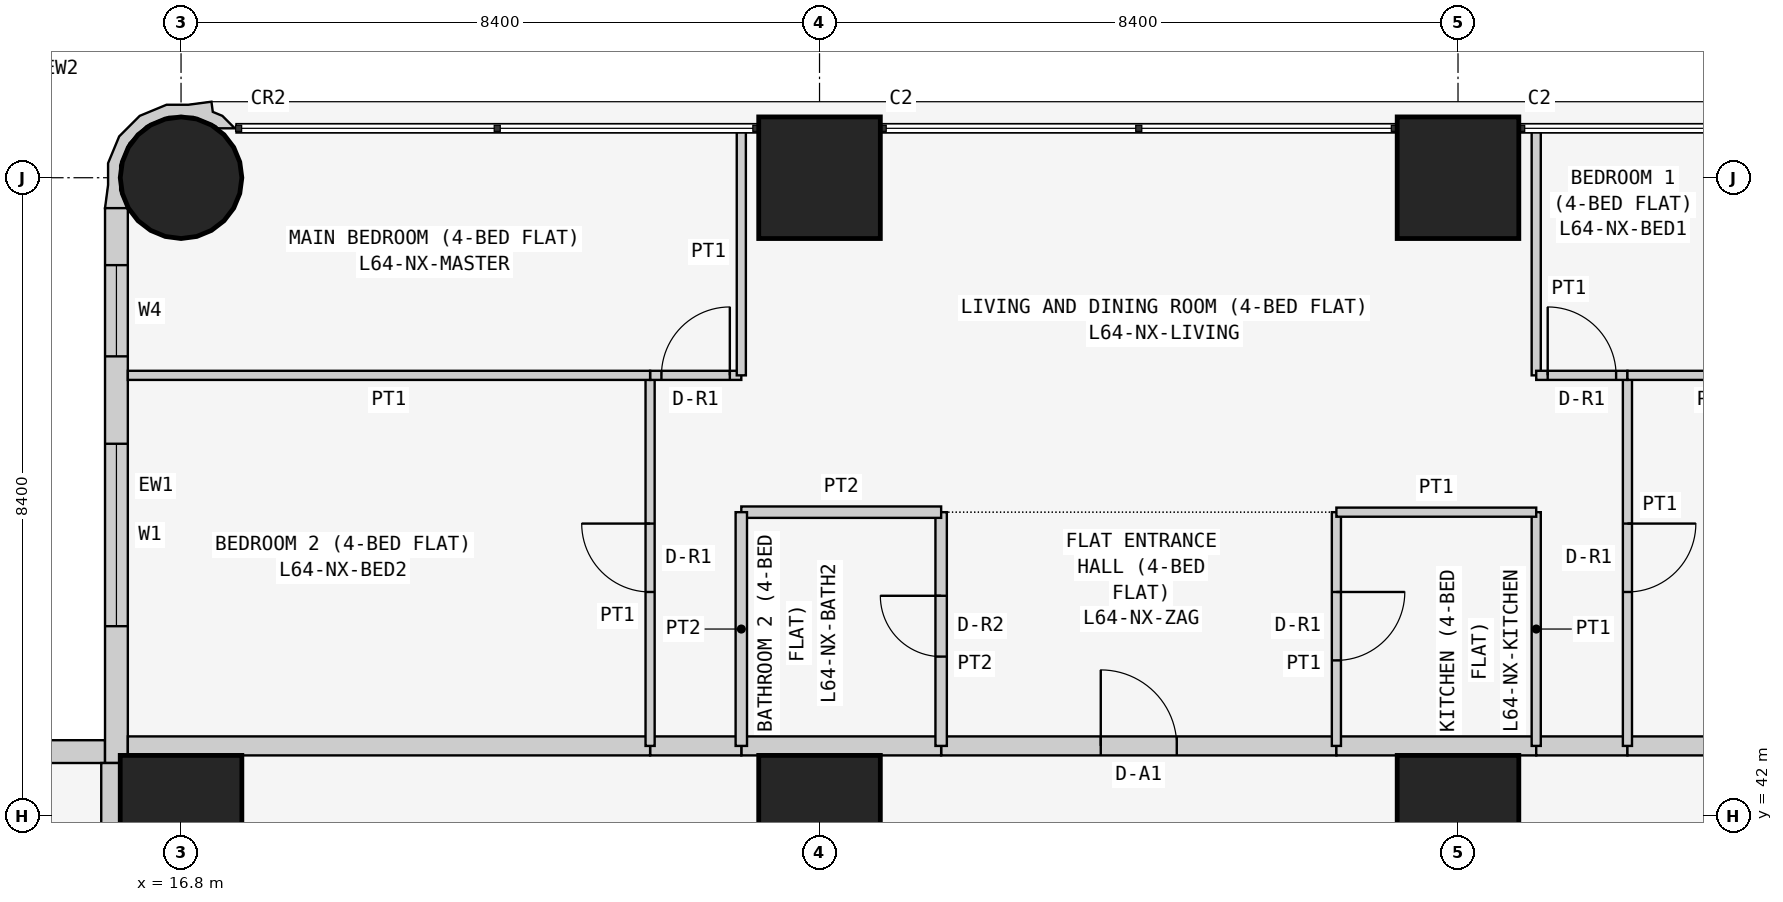
"""IFC4 building model, lengths in metres.
Left out: names, types, materials, properties, quantities, classifications, styles, units other than length and angle.
Written with IfcOpenShell. Run it as: python <this file> out.ifc"""

import sys

from ifc_helpers import new_model, si_unit, direction, frame, frame_2d, origin, origin_2d, place, context, subcontext, project, spatial, polyline, rectangle, circle, outline, extrude, element, fill, save


model = new_model("IFC4")
c1 = context("Model", 3, precision=1e-05, world=origin(), true_north=direction((0.0, 1.0)))
c2 = subcontext(c1, "Body", "Model", "MODEL_VIEW")
j1 = project(units=[si_unit("LENGTHUNIT", "METRE"), si_unit("PLANEANGLEUNIT", "RADIAN")], contexts=[c1])
p1 = place(None, origin())
s1 = spatial("IfcSite", under=j1, at=p1, CompositionType="ELEMENT")
p2 = place(p1, origin())
s2 = spatial("IfcBuilding", under=s1, at=p2, CompositionType="ELEMENT")
p3 = place(p2, frame((0.0, 0.0, 244.5)))
s3 = spatial("IfcBuildingStorey", under=s2, at=p3, CompositionType="ELEMENT", Elevation=244.5)
p4 = place(p3, frame((16.8, 42.0, 0.0), z_axis=(0.0, 0.0, 1.0), x_axis=(1.0, 0.0, 0.0)))
e1 = element("IfcColumn", 1, at=p4, inside=s3, PredefinedType="COLUMN", context=c2, shape_type="SweptSolid", body=[
    extrude(rectangle(XDim=1.6, YDim=1.6, at=origin_2d()), origin(), (0.0, 0.0, 1.0), 3.6),
])
p5 = place(p3, frame((16.8, 50.4, 0.0), z_axis=(0.0, 0.0, 1.0), x_axis=(1.0, 0.0, 0.0)))
e2 = element("IfcColumn", 2, at=p5, inside=s3, PredefinedType="COLUMN", context=c2, shape_type="SweptSolid", body=[
    extrude(circle(Radius=0.8, at=origin_2d()), origin(), (0.0, 0.0, 1.0), 3.6),
])
for number, where, z_axis, x_axis in (
    (3, (25.2, 42.0, 0.0), (0.0, 0.0, 1.0), (1.0, 0.0, 0.0)),
    (4, (25.2, 50.4, 0.0), (0.0, 0.0, 1.0), (1.0, 0.0, 0.0)),
    (5, (33.6, 42.0, 0.0), (0.0, 0.0, 1.0), (1.0, 0.0, 0.0)),
    (6, (33.6, 50.4, 0.0), (0.0, 0.0, 1.0), (1.0, 0.0, 0.0)),
):
    element("IfcColumn", number, at=place(p3, frame(where, z_axis=z_axis, x_axis=x_axis)), inside=s3, PredefinedType="COLUMN", context=c2, shape_type="SweptSolid", body=[
        extrude(rectangle(XDim=1.6, YDim=1.6, at=origin_2d()), origin(), (0.0, 0.0, 1.0), 3.6),
    ])
p6 = place(p3, frame((15.8, 42.85, 0.0), z_axis=(0.0, 0.0, 1.0), x_axis=(-1.0, 0.0, 0.0)))
e7 = element("IfcWall", 7, at=p6, inside=s3, PredefinedType="SOLIDWALL", context=c2, shape_type="SweptSolid", body=[
    extrude(rectangle(XDim=15.4, YDim=0.3, at=frame_2d((7.7, 0.0))), origin(), (0.0, 0.0, 1.0), 3.35),
])
p7 = place(p6, frame((1.2, 0.0, 0.9)))
e8 = element("IfcOpeningElement", 8, at=p7, cuts=e7, PredefinedType="OPENING", context=c2, shape_type="SweptSolid", body=[
    extrude(rectangle(XDim=1.8, YDim=1.5, at=frame_2d((0.9, 0.75))), frame((0.0, 0.16, 0.0), z_axis=(0.0, -1.0, 0.0), x_axis=(1.0, 0.0, 0.0)), (0.0, 0.0, 1.0), 0.32),
])
p8 = place(p6, frame((4.95, 0.0, 1.5)))
e9 = element("IfcOpeningElement", 9, at=p8, cuts=e7, PredefinedType="OPENING", context=c2, shape_type="SweptSolid", body=[
    extrude(rectangle(XDim=0.9, YDim=0.7, at=frame_2d((0.45, 0.35))), frame((0.0, 0.16, 0.0), z_axis=(0.0, -1.0, 0.0), x_axis=(1.0, 0.0, 0.0)), (0.0, 0.0, 1.0), 0.32),
])
p9 = place(p6, frame((8.5, 0.0, 0.9)))
e10 = element("IfcOpeningElement", 10, at=p9, cuts=e7, PredefinedType="OPENING", context=c2, shape_type="SweptSolid", body=[
    extrude(rectangle(XDim=1.8, YDim=1.5, at=frame_2d((0.9, 0.75))), frame((0.0, 0.16, 0.0), z_axis=(0.0, -1.0, 0.0), x_axis=(1.0, 0.0, 0.0)), (0.0, 0.0, 1.0), 0.32),
])
p10 = place(p6, frame((12.5, 0.0, 0.0)))
e11 = element("IfcOpeningElement", 11, at=p10, cuts=e7, PredefinedType="OPENING", context=c2, shape_type="SweptSolid", body=[
    extrude(rectangle(XDim=0.9, YDim=2.4, at=frame_2d((0.45, 1.2))), frame((0.0, 0.16, 0.0), z_axis=(0.0, -1.0, 0.0), x_axis=(1.0, 0.0, 0.0)), (0.0, 0.0, 1.0), 0.32),
])
p11 = place(p6, frame((13.5, 0.0, 0.9)))
e12 = element("IfcOpeningElement", 12, at=p11, cuts=e7, PredefinedType="OPENING", context=c2, shape_type="SweptSolid", body=[
    extrude(rectangle(XDim=1.2, YDim=1.5, at=frame_2d((0.6, 0.75))), frame((0.0, 0.16, 0.0), z_axis=(0.0, -1.0, 0.0), x_axis=(1.0, 0.0, 0.0)), (0.0, 0.0, 1.0), 0.32),
])
p12 = place(p3, frame((15.95, 50.0, 0.0), z_axis=(0.0, 0.0, 1.0), x_axis=(0.0, -1.0, 0.0)))
e13 = element("IfcWall", 13, at=p12, inside=s3, PredefinedType="SOLIDWALL", context=c2, shape_type="SweptSolid", body=[
    extrude(rectangle(XDim=7.3, YDim=0.3, at=frame_2d((3.65, 0.0))), origin(), (0.0, 0.0, 1.0), 3.35),
])
p13 = place(p12, frame((3.1, 0.0, 0.9)))
e14 = element("IfcOpeningElement", 14, at=p13, cuts=e13, PredefinedType="OPENING", context=c2, shape_type="SweptSolid", body=[
    extrude(rectangle(XDim=2.4, YDim=1.5, at=frame_2d((1.2, 0.75))), frame((0.0, 0.16, 0.0), z_axis=(0.0, -1.0, 0.0), x_axis=(1.0, 0.0, 0.0)), (0.0, 0.0, 1.0), 0.32),
])
p14 = place(p12, frame((0.75, 0.0, 0.9)))
e15 = element("IfcOpeningElement", 15, at=p14, cuts=e13, PredefinedType="OPENING", context=c2, shape_type="SweptSolid", body=[
    extrude(rectangle(XDim=1.2, YDim=1.5, at=frame_2d((0.6, 0.75))), frame((0.0, 0.16, 0.0), z_axis=(0.0, -1.0, 0.0), x_axis=(1.0, 0.0, 0.0)), (0.0, 0.0, 1.0), 0.32),
])
p15 = place(p3, frame((17.448, 50.995, 0.0), z_axis=(0.0, 0.0, 1.0), x_axis=(-0.343276641956, 0.93923434088, 0.0)))
e16 = element("IfcWall", 16, at=p15, inside=s3, PredefinedType="SOLIDWALL", context=c2, shape_type="SweptSolid", body=[
    extrude(outline(polyline([(0.241, 0.023), (0.333, 0.124), (0.465, 0.094), (0.532, 0.393), (0.631, 0.663), (0.614, 1.045), (0.454, 1.391), (0.172, 1.649), (-0.098, 1.748), (-0.369, 1.89), (-0.509, 1.621), (-0.491, 1.615), (-0.479, 1.609), (-0.211, 1.62), (0.088, 1.511), (0.323, 1.295), (0.457, 1.006), (0.47, 0.688), (0.361, 0.389), (0.145, 0.154), (0.108, 0.137), (0.031, -0.075), (0.241, 0.023)])), origin(), (0.0, 0.0, 1.0), 3.35),
])
p16 = place(p3, frame((26.8, 42.925, 0.0), z_axis=(0.0, 0.0, 1.0), x_axis=(1.0, 0.0, 0.0)))
e17 = element("IfcWall", 17, at=p16, inside=s3, PredefinedType="PARTITIONING", context=c2, shape_type="SweptSolid", body=[
    extrude(rectangle(XDim=5.2, YDim=0.25, at=frame_2d((2.6, 0.0))), origin(), (0.0, 0.0, 1.0), 3.35),
])
p17 = place(p16, frame((2.1, 0.0, 0.0)))
e18 = element("IfcOpeningElement", 18, at=p17, cuts=e17, PredefinedType="OPENING", context=c2, shape_type="SweptSolid", body=[
    extrude(rectangle(XDim=1.0, YDim=2.1, at=frame_2d((0.5, 1.05))), frame((0.0, 0.135, 0.0), z_axis=(0.0, -1.0, 0.0), x_axis=(1.0, 0.0, 0.0)), (0.0, 0.0, 1.0), 0.27),
])
p18 = place(p3, frame((24.171, 42.925, 0.0), z_axis=(0.0, 0.0, 1.0), x_axis=(1.0, 0.0, 0.0)))
e19 = element("IfcWall", 19, at=p18, inside=s3, PredefinedType="PARTITIONING", context=c2, shape_type="SweptSolid", body=[
    extrude(rectangle(XDim=2.629, YDim=0.25, at=frame_2d((1.314, 0.0))), origin(), (0.0, 0.0, 1.0), 3.35),
])
p19 = place(p3, frame((32.0, 42.925, 0.0), z_axis=(0.0, 0.0, 1.0), x_axis=(1.0, 0.0, 0.0)))
e20 = element("IfcWall", 20, at=p19, inside=s3, PredefinedType="PARTITIONING", context=c2, shape_type="SweptSolid", body=[
    extrude(rectangle(XDim=2.629, YDim=0.25, at=frame_2d((1.314, 0.0))), origin(), (0.0, 0.0, 1.0), 3.35),
])
p20 = place(p3, frame((22.971, 42.925, 0.0), z_axis=(0.0, 0.0, 1.0), x_axis=(1.0, 0.0, 0.0)))
e21 = element("IfcWall", 21, at=p20, inside=s3, PredefinedType="PARTITIONING", context=c2, shape_type="SweptSolid", body=[
    extrude(rectangle(XDim=1.2, YDim=0.25, at=frame_2d((0.6, 0.0))), origin(), (0.0, 0.0, 1.0), 3.35),
])
p21 = place(p3, frame((34.629, 42.925, 0.0), z_axis=(0.0, 0.0, 1.0), x_axis=(1.0, 0.0, 0.0)))
e22 = element("IfcWall", 22, at=p21, inside=s3, PredefinedType="PARTITIONING", context=c2, shape_type="SweptSolid", body=[
    extrude(rectangle(XDim=1.2, YDim=0.25, at=frame_2d((0.6, 0.0))), origin(), (0.0, 0.0, 1.0), 3.35),
])
for number, where, z_axis, x_axis in (
    (23, (16.1, 42.925, 0.0), (0.0, 0.0, 1.0), (1.0, 0.0, 0.0)),
    (24, (35.829, 42.925, 0.0), (0.0, 0.0, 1.0), (1.0, 0.0, 0.0)),
):
    element("IfcWall", number, at=place(p3, frame(where, z_axis=z_axis, x_axis=x_axis)), inside=s3, PredefinedType="PARTITIONING", context=c2, shape_type="SweptSolid", body=[
        extrude(rectangle(XDim=6.871, YDim=0.25, at=frame_2d((3.436, 0.0))), origin(), (0.0, 0.0, 1.0), 3.35),
    ])
p22 = place(p3, frame((15.875, 36.229, 0.0), z_axis=(0.0, 0.0, 1.0), x_axis=(0.0, 1.0, 0.0)))
e25 = element("IfcWall", 25, at=p22, inside=s3, PredefinedType="PARTITIONING", context=c2, shape_type="SweptSolid", body=[
    extrude(rectangle(XDim=6.471, YDim=0.25, at=frame_2d((3.235, 0.0))), origin(), (0.0, 0.0, 1.0), 3.35),
])
p23 = place(p3, frame((26.8, 46.0, 0.0), z_axis=(0.0, 0.0, 1.0), x_axis=(0.0, -1.0, 0.0)))
e26 = element("IfcWall", 26, at=p23, inside=s3, PredefinedType="PARTITIONING", context=c2, shape_type="SweptSolid", body=[
    extrude(rectangle(XDim=3.075, YDim=0.15, at=frame_2d((1.538, 0.0))), origin(), (0.0, 0.0, 1.0), 3.35),
])
p24 = place(p23, frame((1.1, 0.0, 0.0)))
e27 = element("IfcOpeningElement", 27, at=p24, cuts=e26, PredefinedType="OPENING", context=c2, shape_type="SweptSolid", body=[
    extrude(rectangle(XDim=0.8, YDim=2.1, at=frame_2d((0.4, 1.05))), frame((0.0, 0.085, 0.0), z_axis=(0.0, -1.0, 0.0), x_axis=(1.0, 0.0, 0.0)), (0.0, 0.0, 1.0), 0.17),
])
p25 = place(p3, frame((32.0, 42.925, 0.0), z_axis=(0.0, 0.0, 1.0), x_axis=(0.0, 1.0, 0.0)))
e28 = element("IfcWall", 28, at=p25, inside=s3, PredefinedType="PARTITIONING", context=c2, shape_type="SweptSolid", body=[
    extrude(rectangle(XDim=3.075, YDim=0.12, at=frame_2d((1.538, 0.0))), origin(), (0.0, 0.0, 1.0), 3.35),
])
p26 = place(p25, frame((1.125, 0.0, 0.0)))
e29 = element("IfcOpeningElement", 29, at=p26, cuts=e28, PredefinedType="OPENING", context=c2, shape_type="SweptSolid", body=[
    extrude(rectangle(XDim=0.9, YDim=2.1, at=frame_2d((0.45, 1.05))), frame((0.0, 0.07, 0.0), z_axis=(0.0, -1.0, 0.0), x_axis=(1.0, 0.0, 0.0)), (0.0, 0.0, 1.0), 0.14),
])
p27 = place(p3, frame((26.8, 46.0, 0.0), z_axis=(0.0, 0.0, 1.0), x_axis=(-1.0, 0.0, 0.0)))
e30 = element("IfcWall", 30, at=p27, inside=s3, PredefinedType="PARTITIONING", context=c2, shape_type="SweptSolid", body=[
    extrude(rectangle(XDim=2.629, YDim=0.15, at=frame_2d((1.314, 0.0))), origin(), (0.0, 0.0, 1.0), 3.35),
])
p28 = place(p3, frame((24.171, 46.0, 0.0), z_axis=(0.0, 0.0, 1.0), x_axis=(0.0, -1.0, 0.0)))
e31 = element("IfcWall", 31, at=p28, inside=s3, PredefinedType="PARTITIONING", context=c2, shape_type="SweptSolid", body=[
    extrude(rectangle(XDim=3.075, YDim=0.15, at=frame_2d((1.538, 0.0))), origin(), (0.0, 0.0, 1.0), 3.35),
])
p29 = place(p3, frame((34.629, 42.925, 0.0), z_axis=(0.0, 0.0, 1.0), x_axis=(0.0, 1.0, 0.0)))
e32 = element("IfcWall", 32, at=p29, inside=s3, PredefinedType="PARTITIONING", context=c2, shape_type="SweptSolid", body=[
    extrude(rectangle(XDim=3.075, YDim=0.12, at=frame_2d((1.538, 0.0))), origin(), (0.0, 0.0, 1.0), 3.35),
])
p30 = place(p3, frame((34.629, 46.0, 0.0), z_axis=(0.0, 0.0, 1.0), x_axis=(-1.0, 0.0, 0.0)))
e33 = element("IfcWall", 33, at=p30, inside=s3, PredefinedType="PARTITIONING", context=c2, shape_type="SweptSolid", body=[
    extrude(rectangle(XDim=2.629, YDim=0.12, at=frame_2d((1.314, 0.0))), origin(), (0.0, 0.0, 1.0), 3.35),
])
p31 = place(p3, frame((22.971, 42.925, 0.0), z_axis=(0.0, 0.0, 1.0), x_axis=(0.0, 1.0, 0.0)))
e34 = element("IfcWall", 34, at=p31, inside=s3, PredefinedType="PARTITIONING", context=c2, shape_type="SweptSolid", body=[
    extrude(rectangle(XDim=4.875, YDim=0.12, at=frame_2d((2.438, 0.0))), origin(), (0.0, 0.0, 1.0), 3.35),
])
p32 = place(p31, frame((2.025, 0.0, 0.0)))
e35 = element("IfcOpeningElement", 35, at=p32, cuts=e34, PredefinedType="OPENING", context=c2, shape_type="SweptSolid", body=[
    extrude(rectangle(XDim=0.9, YDim=2.1, at=frame_2d((0.45, 1.05))), frame((0.0, 0.07, 0.0), z_axis=(0.0, -1.0, 0.0), x_axis=(1.0, 0.0, 0.0)), (0.0, 0.0, 1.0), 0.14),
])
p33 = place(p3, frame((22.971, 47.8, 0.0), z_axis=(0.0, 0.0, 1.0), x_axis=(1.0, 0.0, 0.0)))
e36 = element("IfcWall", 36, at=p33, inside=s3, PredefinedType="PARTITIONING", context=c2, shape_type="SweptSolid", body=[
    extrude(rectangle(XDim=1.2, YDim=0.12, at=frame_2d((0.6, 0.0))), origin(), (0.0, 0.0, 1.0), 3.35),
])
p34 = place(p33, frame((0.149, 0.0, 0.0)))
e37 = element("IfcOpeningElement", 37, at=p34, cuts=e36, PredefinedType="OPENING", context=c2, shape_type="SweptSolid", body=[
    extrude(rectangle(XDim=0.9, YDim=2.1, at=frame_2d((0.45, 1.05))), frame((0.0, 0.07, 0.0), z_axis=(0.0, -1.0, 0.0), x_axis=(1.0, 0.0, 0.0)), (0.0, 0.0, 1.0), 0.14),
])
p35 = place(p3, frame((24.171, 47.8, 0.0), z_axis=(0.0, 0.0, 1.0), x_axis=(0.0, 1.0, 0.0)))
e38 = element("IfcWall", 38, at=p35, inside=s3, PredefinedType="PARTITIONING", context=c2, shape_type="SweptSolid", body=[
    extrude(rectangle(XDim=3.25, YDim=0.12, at=frame_2d((1.625, 0.0))), origin(), (0.0, 0.0, 1.0), 3.35),
])
p36 = place(p3, frame((35.829, 47.8, 0.0), z_axis=(0.0, 0.0, 1.0), x_axis=(0.0, -1.0, 0.0)))
e39 = element("IfcWall", 39, at=p36, inside=s3, PredefinedType="PARTITIONING", context=c2, shape_type="SweptSolid", body=[
    extrude(rectangle(XDim=4.875, YDim=0.12, at=frame_2d((2.438, 0.0))), origin(), (0.0, 0.0, 1.0), 3.35),
])
p37 = place(p36, frame((1.95, 0.0, 0.0)))
e40 = element("IfcOpeningElement", 40, at=p37, cuts=e39, PredefinedType="OPENING", context=c2, shape_type="SweptSolid", body=[
    extrude(rectangle(XDim=0.9, YDim=2.1, at=frame_2d((0.45, 1.05))), frame((0.0, 0.07, 0.0), z_axis=(0.0, -1.0, 0.0), x_axis=(1.0, 0.0, 0.0)), (0.0, 0.0, 1.0), 0.14),
])
p38 = place(p3, frame((34.629, 51.05, 0.0), z_axis=(0.0, 0.0, 1.0), x_axis=(0.0, -1.0, 0.0)))
e41 = element("IfcWall", 41, at=p38, inside=s3, PredefinedType="PARTITIONING", context=c2, shape_type="SweptSolid", body=[
    extrude(rectangle(XDim=3.25, YDim=0.12, at=frame_2d((1.625, 0.0))), origin(), (0.0, 0.0, 1.0), 3.35),
])
p39 = place(p3, frame((34.629, 47.8, 0.0), z_axis=(0.0, 0.0, 1.0), x_axis=(1.0, 0.0, 0.0)))
e42 = element("IfcWall", 42, at=p39, inside=s3, PredefinedType="PARTITIONING", context=c2, shape_type="SweptSolid", body=[
    extrude(rectangle(XDim=1.2, YDim=0.12, at=frame_2d((0.6, 0.0))), origin(), (0.0, 0.0, 1.0), 3.35),
])
p40 = place(p39, frame((0.151, 0.0, 0.0)))
e43 = element("IfcOpeningElement", 43, at=p40, cuts=e42, PredefinedType="OPENING", context=c2, shape_type="SweptSolid", body=[
    extrude(rectangle(XDim=0.9, YDim=2.1, at=frame_2d((0.45, 1.05))), frame((0.0, 0.07, 0.0), z_axis=(0.0, -1.0, 0.0), x_axis=(1.0, 0.0, 0.0)), (0.0, 0.0, 1.0), 0.14),
])
p41 = place(p3, frame((22.971, 47.8, 0.0), z_axis=(0.0, 0.0, 1.0), x_axis=(-1.0, 0.0, 0.0)))
e44 = element("IfcWall", 44, at=p41, inside=s3, PredefinedType="PARTITIONING", context=c2, shape_type="SweptSolid", body=[
    extrude(rectangle(XDim=6.871, YDim=0.12, at=frame_2d((3.436, 0.0))), origin(), (0.0, 0.0, 1.0), 3.35),
])
p42 = place(p3, frame((38.114, 47.8, 0.0), z_axis=(0.0, 0.0, 1.0), x_axis=(-1.0, 0.0, 0.0)))
e45 = element("IfcWall", 45, at=p42, inside=s3, PredefinedType="PARTITIONING", context=c2, shape_type="SweptSolid", body=[
    extrude(rectangle(XDim=2.285, YDim=0.12, at=frame_2d((1.143, 0.0))), origin(), (0.0, 0.0, 1.0), 3.35),
])
p43 = place(p13, origin())
e46 = element("IfcWindow", 46, at=p43, inside=s3, PartitioningType="SINGLE_PANEL", PredefinedType="WINDOW", context=c2, shape_type="SweptSolid", body=[
    extrude(rectangle(XDim=2.4, YDim=1.5, at=frame_2d((1.2, 0.75))), frame((0.0, 0.03, 0.0), z_axis=(0.0, -1.0, 0.0), x_axis=(1.0, 0.0, 0.0)), (0.0, 0.0, 1.0), 0.06),
])
fill(e14, e46)
p44 = place(p14, origin())
e47 = element("IfcWindow", 47, at=p44, inside=s3, PartitioningType="SINGLE_PANEL", PredefinedType="WINDOW", context=c2, shape_type="SweptSolid", body=[
    extrude(rectangle(XDim=1.2, YDim=1.5, at=frame_2d((0.6, 0.75))), frame((0.0, 0.03, 0.0), z_axis=(0.0, -1.0, 0.0), x_axis=(1.0, 0.0, 0.0)), (0.0, 0.0, 1.0), 0.06),
])
fill(e15, e47)
p45 = place(p17, origin())
e48 = element("IfcDoor", 48, at=p45, inside=s3, OperationType="SINGLE_SWING_LEFT", PredefinedType="DOOR", context=c2, shape_type="SweptSolid", body=[
    extrude(rectangle(XDim=1.0, YDim=2.1, at=frame_2d((0.5, 1.05))), frame((0.0, 0.025, 0.0), z_axis=(0.0, -1.0, 0.0), x_axis=(1.0, 0.0, 0.0)), (0.0, 0.0, 1.0), 0.05),
])
fill(e18, e48)
p46 = place(p24, frame((0.8, 0.0, 0.0), z_axis=(0.0, 0.0, 1.0), x_axis=(-1.0, 0.0, 0.0)))
e49 = element("IfcDoor", 49, at=p46, inside=s3, OperationType="SINGLE_SWING_RIGHT", PredefinedType="DOOR", context=c2, shape_type="SweptSolid", body=[
    extrude(rectangle(XDim=0.8, YDim=2.1, at=frame_2d((0.4, 1.05))), frame((0.0, 0.025, 0.0), z_axis=(0.0, -1.0, 0.0), x_axis=(1.0, 0.0, 0.0)), (0.0, 0.0, 1.0), 0.05),
])
fill(e27, e49)
p47 = place(p26, frame((0.9, 0.0, 0.0), z_axis=(0.0, 0.0, 1.0), x_axis=(-1.0, 0.0, 0.0)))
e50 = element("IfcDoor", 50, at=p47, inside=s3, OperationType="SINGLE_SWING_LEFT", PredefinedType="DOOR", context=c2, shape_type="SweptSolid", body=[
    extrude(rectangle(XDim=0.9, YDim=2.1, at=frame_2d((0.45, 1.05))), frame((0.0, 0.025, 0.0), z_axis=(0.0, -1.0, 0.0), x_axis=(1.0, 0.0, 0.0)), (0.0, 0.0, 1.0), 0.05),
])
fill(e29, e50)
p48 = place(p32, origin())
e51 = element("IfcDoor", 51, at=p48, inside=s3, OperationType="SINGLE_SWING_RIGHT", PredefinedType="DOOR", context=c2, shape_type="SweptSolid", body=[
    extrude(rectangle(XDim=0.9, YDim=2.1, at=frame_2d((0.45, 1.05))), frame((0.0, 0.025, 0.0), z_axis=(0.0, -1.0, 0.0), x_axis=(1.0, 0.0, 0.0)), (0.0, 0.0, 1.0), 0.05),
])
fill(e35, e51)
p49 = place(p34, origin())
e52 = element("IfcDoor", 52, at=p49, inside=s3, OperationType="SINGLE_SWING_RIGHT", PredefinedType="DOOR", context=c2, shape_type="SweptSolid", body=[
    extrude(rectangle(XDim=0.9, YDim=2.1, at=frame_2d((0.45, 1.05))), frame((0.0, 0.025, 0.0), z_axis=(0.0, -1.0, 0.0), x_axis=(1.0, 0.0, 0.0)), (0.0, 0.0, 1.0), 0.05),
])
fill(e37, e52)
p50 = place(p37, origin())
e53 = element("IfcDoor", 53, at=p50, inside=s3, OperationType="SINGLE_SWING_LEFT", PredefinedType="DOOR", context=c2, shape_type="SweptSolid", body=[
    extrude(rectangle(XDim=0.9, YDim=2.1, at=frame_2d((0.45, 1.05))), frame((0.0, 0.025, 0.0), z_axis=(0.0, -1.0, 0.0), x_axis=(1.0, 0.0, 0.0)), (0.0, 0.0, 1.0), 0.05),
])
fill(e40, e53)
p51 = place(p40, origin())
e54 = element("IfcDoor", 54, at=p51, inside=s3, OperationType="SINGLE_SWING_LEFT", PredefinedType="DOOR", context=c2, shape_type="SweptSolid", body=[
    extrude(rectangle(XDim=0.9, YDim=2.1, at=frame_2d((0.45, 1.05))), frame((0.0, 0.025, 0.0), z_axis=(0.0, -1.0, 0.0), x_axis=(1.0, 0.0, 0.0)), (0.0, 0.0, 1.0), 0.05),
])
fill(e43, e54)
save(model, sys.argv[1])
